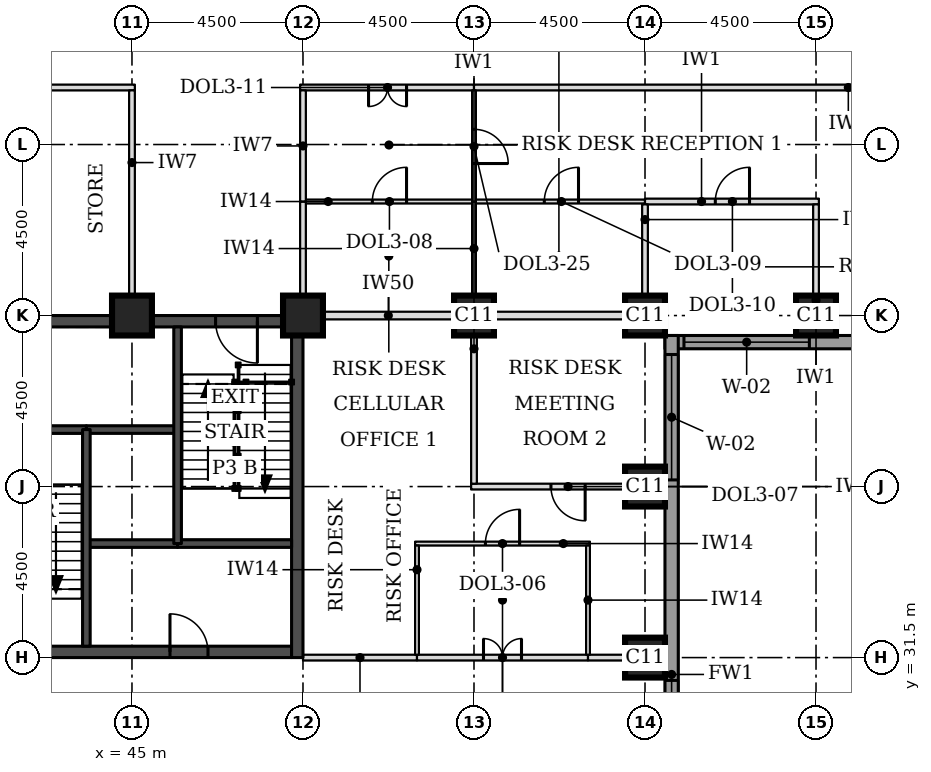
"""IFC4 building model, lengths in metres.
Left out: names, types, materials, properties, quantities, classifications, styles, units other than length and angle.
Written with IfcOpenShell. Run it as: python <this file> out.ifc"""

import sys

from ifc_helpers import new_model, si_unit, direction, frame, frame_2d, origin, origin_2d, place, context, subcontext, project, spatial, rectangle, extrude, element, fill, save


model = new_model("IFC4")
c1 = context("Model", 3, precision=1e-05, world=origin(), true_north=direction((0.0, 1.0)))
c2 = subcontext(c1, "Body", "Model", "MODEL_VIEW")
j1 = project(units=[si_unit("LENGTHUNIT", "METRE"), si_unit("PLANEANGLEUNIT", "RADIAN")], contexts=[c1])
p1 = place(None, origin())
s1 = spatial("IfcSite", under=j1, at=p1, CompositionType="ELEMENT")
p2 = place(p1, origin())
s2 = spatial("IfcBuilding", under=s1, at=p2, CompositionType="ELEMENT")
p3 = place(p2, frame((0.0, 0.0, 97.4)))
s3 = spatial("IfcBuildingStorey", under=s2, at=p3, CompositionType="ELEMENT", Elevation=97.4)
for number, where, z_axis, x_axis in (
    (1, (58.5, 31.5, 0.0), (0.0, 0.0, 1.0), (1.0, 0.0, 0.0)),
    (2, (58.5, 36.0, 0.0), (0.0, 0.0, 1.0), (1.0, 0.0, 0.0)),
    (3, (45.0, 40.5, 0.0), (0.0, 0.0, 1.0), (1.0, 0.0, 0.0)),
    (4, (49.5, 40.5, 0.0), (0.0, 0.0, 1.0), (1.0, 0.0, 0.0)),
    (5, (54.0, 40.5, 0.0), (0.0, 0.0, 1.0), (1.0, 0.0, 0.0)),
    (6, (58.5, 40.5, 0.0), (0.0, 0.0, 1.0), (1.0, 0.0, 0.0)),
    (7, (63.0, 40.5, 0.0), (0.0, 0.0, 1.0), (1.0, 0.0, 0.0)),
):
    element("IfcColumn", number, at=place(p3, frame(where, z_axis=z_axis, x_axis=x_axis)), inside=s3, PredefinedType="COLUMN", context=c2, shape_type="SweptSolid", body=[
        extrude(rectangle(XDim=1.05, YDim=1.05, at=origin_2d()), origin(), (0.0, 0.0, 1.0), 3.7),
    ])
p4 = place(p3, frame((40.8, 31.65, 0.0), z_axis=(0.0, 0.0, 1.0), x_axis=(1.0, 0.0, 0.0)))
e8 = element("IfcWall", 8, at=p4, inside=s3, PredefinedType="SHEAR", context=c2, shape_type="SweptSolid", body=[
    extrude(rectangle(XDim=8.4, YDim=0.3, at=frame_2d((4.2, 0.0))), origin(), (0.0, 0.0, 1.0), 3.7),
])
p5 = place(p4, frame((5.2, 0.0, 0.0)))
e9 = element("IfcOpeningElement", 9, at=p5, cuts=e8, PredefinedType="OPENING", context=c2, shape_type="SweptSolid", body=[
    extrude(rectangle(XDim=1.0, YDim=2.1, at=frame_2d((0.5, 1.05))), frame((0.0, 0.16, 0.0), z_axis=(0.0, -1.0, 0.0), x_axis=(1.0, 0.0, 0.0)), (0.0, 0.0, 1.0), 0.32),
])
p6 = place(p3, frame((40.8, 40.35, 0.0), z_axis=(0.0, 0.0, 1.0), x_axis=(1.0, 0.0, 0.0)))
e10 = element("IfcWall", 10, at=p6, inside=s3, PredefinedType="SHEAR", context=c2, shape_type="SweptSolid", body=[
    extrude(rectangle(XDim=8.4, YDim=0.3, at=frame_2d((4.2, 0.0))), origin(), (0.0, 0.0, 1.0), 3.7),
])
p7 = place(p6, frame((6.4, 0.0, 0.0)))
e11 = element("IfcOpeningElement", 11, at=p7, cuts=e10, PredefinedType="OPENING", context=c2, shape_type="SweptSolid", body=[
    extrude(rectangle(XDim=1.1, YDim=2.1, at=frame_2d((0.55, 1.05))), frame((0.0, 0.16, 0.0), z_axis=(0.0, -1.0, 0.0), x_axis=(1.0, 0.0, 0.0)), (0.0, 0.0, 1.0), 0.32),
])
p8 = place(p3, frame((49.35, 31.5, 0.0), z_axis=(0.0, 0.0, 1.0), x_axis=(0.0, 1.0, 0.0)))
e12 = element("IfcWall", 12, at=p8, inside=s3, PredefinedType="SHEAR", context=c2, shape_type="SweptSolid", body=[
    extrude(rectangle(XDim=9.0, YDim=0.3, at=frame_2d((4.5, 0.0))), origin(), (0.0, 0.0, 1.0), 3.7),
])
p9 = place(p3, frame((59.025, 39.8, 0.0), z_axis=(0.0, 0.0, 1.0), x_axis=(1.0, 0.0, 0.0)))
e13 = element("IfcWall", 13, at=p9, inside=s3, PredefinedType="STANDARD", context=c2, shape_type="SweptSolid", body=[
    extrude(rectangle(XDim=13.337, YDim=0.35, at=frame_2d((6.669, 0.0))), origin(), (0.0, 0.0, 1.0), 3.525),
])
p10 = place(p9, frame((0.5, 0.0, 0.9)))
e14 = element("IfcOpeningElement", 14, at=p10, cuts=e13, PredefinedType="OPENING", context=c2, shape_type="SweptSolid", body=[
    extrude(rectangle(XDim=3.3, YDim=1.9, at=frame_2d((1.65, 0.95))), frame((0.0, 0.185, 0.0), z_axis=(0.0, -1.0, 0.0), x_axis=(1.0, 0.0, 0.0)), (0.0, 0.0, 1.0), 0.37),
])
p11 = place(p3, frame((59.2, 22.138, 0.0), z_axis=(0.0, 0.0, 1.0), x_axis=(0.0, 1.0, 0.0)))
e15 = element("IfcWall", 15, at=p11, inside=s3, PredefinedType="STANDARD", context=c2, shape_type="SweptSolid", body=[
    extrude(rectangle(XDim=17.837, YDim=0.35, at=frame_2d((8.919, 0.0))), origin(), (0.0, 0.0, 1.0), 3.525),
])
p12 = place(p11, frame((5.462, 0.0, 0.9)))
e16 = element("IfcOpeningElement", 16, at=p12, cuts=e15, PredefinedType="OPENING", context=c2, shape_type="SweptSolid", body=[
    extrude(rectangle(XDim=3.3, YDim=1.9, at=frame_2d((1.65, 0.95))), frame((0.0, 0.185, 0.0), z_axis=(0.0, -1.0, 0.0), x_axis=(1.0, 0.0, 0.0)), (0.0, 0.0, 1.0), 0.37),
])
p13 = place(p11, frame((14.037, 0.0, 0.9)))
e17 = element("IfcOpeningElement", 17, at=p13, cuts=e15, PredefinedType="OPENING", context=c2, shape_type="SweptSolid", body=[
    extrude(rectangle(XDim=3.3, YDim=1.9, at=frame_2d((1.65, 0.95))), frame((0.0, 0.185, 0.0), z_axis=(0.0, -1.0, 0.0), x_axis=(1.0, 0.0, 0.0)), (0.0, 0.0, 1.0), 0.37),
])
p14 = place(p3, frame((49.5, 31.5, 0.0), z_axis=(0.0, 0.0, 1.0), x_axis=(1.0, 0.0, 0.0)))
e18 = element("IfcWall", 18, at=p14, inside=s3, PredefinedType="PARTITIONING", context=c2, shape_type="SweptSolid", body=[
    extrude(rectangle(XDim=3.0, YDim=0.15, at=frame_2d((1.5, 0.0))), origin(), (0.0, 0.0, 1.0), 2.55),
])
p15 = place(p3, frame((52.5, 31.5, 0.0), z_axis=(0.0, 0.0, 1.0), x_axis=(1.0, 0.0, 0.0)))
e19 = element("IfcWall", 19, at=p15, inside=s3, PredefinedType="PARTITIONING", context=c2, shape_type="SweptSolid", body=[
    extrude(rectangle(XDim=4.5, YDim=0.15, at=frame_2d((2.25, 0.0))), origin(), (0.0, 0.0, 1.0), 2.55),
])
p16 = place(p15, frame((1.75, 0.0, 0.0)))
e20 = element("IfcOpeningElement", 20, at=p16, cuts=e19, PredefinedType="OPENING", context=c2, shape_type="SweptSolid", body=[
    extrude(rectangle(XDim=1.0, YDim=2.1, at=frame_2d((0.5, 1.05))), frame((0.0, 0.085, 0.0), z_axis=(0.0, -1.0, 0.0), x_axis=(1.0, 0.0, 0.0)), (0.0, 0.0, 1.0), 0.17),
])
p17 = place(p3, frame((57.0, 31.5, 0.0), z_axis=(0.0, 0.0, 1.0), x_axis=(1.0, 0.0, 0.0)))
e21 = element("IfcWall", 21, at=p17, inside=s3, PredefinedType="PARTITIONING", context=c2, shape_type="SweptSolid", body=[
    extrude(rectangle(XDim=2.025, YDim=0.15, at=frame_2d((1.012, 0.0))), origin(), (0.0, 0.0, 1.0), 2.55),
])
p18 = place(p3, frame((52.45, 34.5, 0.0), z_axis=(0.0, 0.0, 1.0), x_axis=(1.0, 0.0, 0.0)))
e22 = element("IfcWall", 22, at=p18, inside=s3, PredefinedType="PARTITIONING", context=c2, shape_type="SweptSolid", body=[
    extrude(rectangle(XDim=4.6, YDim=0.1, at=frame_2d((2.3, 0.0))), origin(), (0.0, 0.0, 1.0), 3.55),
])
p19 = place(p18, frame((1.85, 0.0, 0.0)))
e23 = element("IfcOpeningElement", 23, at=p19, cuts=e22, PredefinedType="OPENING", context=c2, shape_type="SweptSolid", body=[
    extrude(rectangle(XDim=0.9, YDim=2.1, at=frame_2d((0.45, 1.05))), frame((0.0, 0.06, 0.0), z_axis=(0.0, -1.0, 0.0), x_axis=(1.0, 0.0, 0.0)), (0.0, 0.0, 1.0), 0.12),
])
p20 = place(p3, frame((53.925, 36.0, 0.0), z_axis=(0.0, 0.0, 1.0), x_axis=(1.0, 0.0, 0.0)))
e24 = element("IfcWall", 24, at=p20, inside=s3, PredefinedType="PARTITIONING", context=c2, shape_type="SweptSolid", body=[
    extrude(rectangle(XDim=5.1, YDim=0.15, at=frame_2d((2.55, 0.0))), origin(), (0.0, 0.0, 1.0), 3.096),
])
p21 = place(p20, frame((2.1, 0.0, 0.0)))
e25 = element("IfcOpeningElement", 25, at=p21, cuts=e24, PredefinedType="OPENING", context=c2, shape_type="SweptSolid", body=[
    extrude(rectangle(XDim=0.9, YDim=2.1, at=frame_2d((0.45, 1.05))), frame((0.0, 0.085, 0.0), z_axis=(0.0, -1.0, 0.0), x_axis=(1.0, 0.0, 0.0)), (0.0, 0.0, 1.0), 0.17),
])
p22 = place(p3, frame((50.015, 40.5, 0.0), z_axis=(0.0, 0.0, 1.0), x_axis=(1.0, 0.0, 0.0)))
e26 = element("IfcWall", 26, at=p22, inside=s3, PredefinedType="PARTITIONING", context=c2, shape_type="SweptSolid", body=[
    extrude(rectangle(XDim=3.46, YDim=0.2, at=frame_2d((1.73, 0.0))), origin(), (0.0, 0.0, 1.0), 2.8),
])
p23 = place(p3, frame((54.495, 40.5, 0.0), z_axis=(0.0, 0.0, 1.0), x_axis=(1.0, 0.0, 0.0)))
e27 = element("IfcWall", 27, at=p23, inside=s3, PredefinedType="PARTITIONING", context=c2, shape_type="SweptSolid", body=[
    extrude(rectangle(XDim=3.48, YDim=0.2, at=frame_2d((1.74, 0.0))), origin(), (0.0, 0.0, 1.0), 2.8),
])
p24 = place(p3, frame((49.575, 43.5, 0.0), z_axis=(0.0, 0.0, 1.0), x_axis=(1.0, 0.0, 0.0)))
e28 = element("IfcWall", 28, at=p24, inside=s3, PredefinedType="PARTITIONING", context=c2, shape_type="SweptSolid", body=[
    extrude(rectangle(XDim=4.375, YDim=0.1, at=frame_2d((2.188, 0.0))), origin(), (0.0, 0.0, 1.0), 3.55),
])
p25 = place(p24, frame((1.75, 0.0, 0.0)))
e29 = element("IfcOpeningElement", 29, at=p25, cuts=e28, PredefinedType="OPENING", context=c2, shape_type="SweptSolid", body=[
    extrude(rectangle(XDim=0.9, YDim=2.1, at=frame_2d((0.45, 1.05))), frame((0.0, 0.06, 0.0), z_axis=(0.0, -1.0, 0.0), x_axis=(1.0, 0.0, 0.0)), (0.0, 0.0, 1.0), 0.12),
])
p26 = place(p3, frame((54.05, 43.5, 0.0), z_axis=(0.0, 0.0, 1.0), x_axis=(1.0, 0.0, 0.0)))
e30 = element("IfcWall", 30, at=p26, inside=s3, PredefinedType="PARTITIONING", context=c2, shape_type="SweptSolid", body=[
    extrude(rectangle(XDim=4.45, YDim=0.1, at=frame_2d((2.225, 0.0))), origin(), (0.0, 0.0, 1.0), 3.55),
])
p27 = place(p26, frame((1.8, 0.0, 0.0)))
e31 = element("IfcOpeningElement", 31, at=p27, cuts=e30, PredefinedType="OPENING", context=c2, shape_type="SweptSolid", body=[
    extrude(rectangle(XDim=0.9, YDim=2.1, at=frame_2d((0.45, 1.05))), frame((0.0, 0.06, 0.0), z_axis=(0.0, -1.0, 0.0), x_axis=(1.0, 0.0, 0.0)), (0.0, 0.0, 1.0), 0.12),
])
p28 = place(p3, frame((58.5, 43.5, 0.0), z_axis=(0.0, 0.0, 1.0), x_axis=(1.0, 0.0, 0.0)))
e32 = element("IfcWall", 32, at=p28, inside=s3, PredefinedType="PARTITIONING", context=c2, shape_type="SweptSolid", body=[
    extrude(rectangle(XDim=4.575, YDim=0.15, at=frame_2d((2.288, 0.0))), origin(), (0.0, 0.0, 1.0), 3.55),
])
p29 = place(p28, frame((1.85, 0.0, 0.0)))
e33 = element("IfcOpeningElement", 33, at=p29, cuts=e32, PredefinedType="OPENING", context=c2, shape_type="SweptSolid", body=[
    extrude(rectangle(XDim=0.9, YDim=2.1, at=frame_2d((0.45, 1.05))), frame((0.0, 0.085, 0.0), z_axis=(0.0, -1.0, 0.0), x_axis=(1.0, 0.0, 0.0)), (0.0, 0.0, 1.0), 0.17),
])
p30 = place(p3, frame((40.425, 46.5, 0.0), z_axis=(0.0, 0.0, 1.0), x_axis=(1.0, 0.0, 0.0)))
e34 = element("IfcWall", 34, at=p30, inside=s3, PredefinedType="PARTITIONING", context=c2, shape_type="SweptSolid", body=[
    extrude(rectangle(XDim=4.65, YDim=0.15, at=frame_2d((2.325, 0.0))), origin(), (0.0, 0.0, 1.0), 3.55),
])
p31 = place(p3, frame((49.425, 46.5, 0.0), z_axis=(0.0, 0.0, 1.0), x_axis=(1.0, 0.0, 0.0)))
e35 = element("IfcWall", 35, at=p31, inside=s3, PredefinedType="PARTITIONING", context=c2, shape_type="SweptSolid", body=[
    extrude(rectangle(XDim=4.575, YDim=0.15, at=frame_2d((2.288, 0.0))), origin(), (0.0, 0.0, 1.0), 3.55),
])
p32 = place(p31, frame((1.8, 0.0, 0.0)))
e36 = element("IfcOpeningElement", 36, at=p32, cuts=e35, PredefinedType="OPENING", context=c2, shape_type="SweptSolid", body=[
    extrude(rectangle(XDim=1.0, YDim=2.1, at=frame_2d((0.5, 1.05))), frame((0.0, 0.085, 0.0), z_axis=(0.0, -1.0, 0.0), x_axis=(1.0, 0.0, 0.0)), (0.0, 0.0, 1.0), 0.17),
])
p33 = place(p3, frame((54.0, 46.5, 0.0), z_axis=(0.0, 0.0, 1.0), x_axis=(1.0, 0.0, 0.0)))
e37 = element("IfcWall", 37, at=p33, inside=s3, PredefinedType="PARTITIONING", context=c2, shape_type="SweptSolid", body=[
    extrude(rectangle(XDim=16.5, YDim=0.15, at=frame_2d((8.25, 0.0))), origin(), (0.0, 0.0, 1.0), 3.55),
])
for number, where, z_axis, x_axis in (
    (38, (52.5, 31.575, 0.0), (0.0, 0.0, 1.0), (0.0, 1.0, 0.0)),
    (39, (57.0, 31.575, 0.0), (0.0, 0.0, 1.0), (0.0, 1.0, 0.0)),
):
    element("IfcWall", number, at=place(p3, frame(where, z_axis=z_axis, x_axis=x_axis)), inside=s3, PredefinedType="PARTITIONING", context=c2, shape_type="SweptSolid", body=[
        extrude(rectangle(XDim=2.875, YDim=0.1, at=frame_2d((1.438, 0.0))), origin(), (0.0, 0.0, 1.0), 3.55),
    ])
p34 = place(p3, frame((54.0, 36.075, 0.0), z_axis=(0.0, 0.0, 1.0), x_axis=(0.0, 1.0, 0.0)))
e40 = element("IfcWall", 40, at=p34, inside=s3, PredefinedType="PARTITIONING", context=c2, shape_type="SweptSolid", body=[
    extrude(rectangle(XDim=3.9, YDim=0.15, at=frame_2d((1.95, 0.0))), origin(), (0.0, 0.0, 1.0), 3.55),
])
p35 = place(p3, frame((63.0, 39.975, 0.0), z_axis=(0.0, 0.0, 1.0), x_axis=(0.0, 1.0, 0.0)))
e41 = element("IfcWall", 41, at=p35, inside=s3, PredefinedType="PARTITIONING", context=c2, shape_type="SweptSolid", body=[
    extrude(rectangle(XDim=3.45, YDim=0.15, at=frame_2d((1.725, 0.0))), origin(), (0.0, 0.0, 1.0), 3.55),
])
p36 = place(p3, frame((45.0, 41.025, 0.0), z_axis=(0.0, 0.0, 1.0), x_axis=(0.0, 1.0, 0.0)))
e42 = element("IfcWall", 42, at=p36, inside=s3, PredefinedType="PARTITIONING", context=c2, shape_type="SweptSolid", body=[
    extrude(rectangle(XDim=5.4, YDim=0.15, at=frame_2d((2.7, 0.0))), origin(), (0.0, 0.0, 1.0), 3.55),
])
p37 = place(p3, frame((49.5, 41.025, 0.0), z_axis=(0.0, 0.0, 1.0), x_axis=(0.0, 1.0, 0.0)))
e43 = element("IfcWall", 43, at=p37, inside=s3, PredefinedType="PARTITIONING", context=c2, shape_type="SweptSolid", body=[
    extrude(rectangle(XDim=2.475, YDim=0.15, at=frame_2d((1.238, 0.0))), origin(), (0.0, 0.0, 1.0), 3.55),
])
p38 = place(p3, frame((54.0, 41.025, 0.0), z_axis=(0.0, 0.0, 1.0), x_axis=(0.0, 1.0, 0.0)))
e44 = element("IfcWall", 44, at=p38, inside=s3, PredefinedType="PARTITIONING", context=c2, shape_type="SweptSolid", body=[
    extrude(rectangle(XDim=2.475, YDim=0.1, at=frame_2d((1.238, 0.0))), origin(), (0.0, 0.0, 1.0), 3.55),
])
p39 = place(p3, frame((58.5, 41.025, 0.0), z_axis=(0.0, 0.0, 1.0), x_axis=(0.0, 1.0, 0.0)))
e45 = element("IfcWall", 45, at=p39, inside=s3, PredefinedType="PARTITIONING", context=c2, shape_type="SweptSolid", body=[
    extrude(rectangle(XDim=2.4, YDim=0.15, at=frame_2d((1.2, 0.0))), origin(), (0.0, 0.0, 1.0), 3.55),
])
p40 = place(p3, frame((49.5, 43.5, 0.0), z_axis=(0.0, 0.0, 1.0), x_axis=(0.0, 1.0, 0.0)))
e46 = element("IfcWall", 46, at=p40, inside=s3, PredefinedType="PARTITIONING", context=c2, shape_type="SweptSolid", body=[
    extrude(rectangle(XDim=2.925, YDim=0.15, at=frame_2d((1.462, 0.0))), origin(), (0.0, 0.0, 1.0), 3.55),
])
p41 = place(p3, frame((54.0, 43.5, 0.0), z_axis=(0.0, 0.0, 1.0), x_axis=(0.0, 1.0, 0.0)))
e47 = element("IfcWall", 47, at=p41, inside=s3, PredefinedType="PARTITIONING", context=c2, shape_type="SweptSolid", body=[
    extrude(rectangle(XDim=2.925, YDim=0.1, at=frame_2d((1.462, 0.0))), origin(), (0.0, 0.0, 1.0), 3.55),
])
p42 = place(p41, frame((1.0, 0.0, 0.0)))
e48 = element("IfcOpeningElement", 48, at=p42, cuts=e47, PredefinedType="OPENING", context=c2, shape_type="SweptSolid", body=[
    extrude(rectangle(XDim=0.9, YDim=2.1, at=frame_2d((0.45, 1.05))), frame((0.0, 0.06, 0.0), z_axis=(0.0, -1.0, 0.0), x_axis=(1.0, 0.0, 0.0)), (0.0, 0.0, 1.0), 0.12),
])
p43 = place(p3, frame((43.8, 34.5, 0.0), z_axis=(0.0, 0.0, 1.0), x_axis=(1.0, 0.0, 0.0)))
e49 = element("IfcWall", 49, at=p43, inside=s3, PredefinedType="SOLIDWALL", context=c2, shape_type="SweptSolid", body=[
    extrude(rectangle(XDim=2.4, YDim=0.2, at=frame_2d((1.2, 0.0))), origin(), (0.0, 0.0, 1.0), 3.55),
])
p44 = place(p3, frame((46.2, 34.5, 0.0), z_axis=(0.0, 0.0, 1.0), x_axis=(1.0, 0.0, 0.0)))
e50 = element("IfcWall", 50, at=p44, inside=s3, PredefinedType="SOLIDWALL", context=c2, shape_type="SweptSolid", body=[
    extrude(rectangle(XDim=3.0, YDim=0.2, at=frame_2d((1.5, 0.0))), origin(), (0.0, 0.0, 1.0), 3.55),
])
p45 = place(p3, frame((43.8, 37.5, 0.0), z_axis=(0.0, 0.0, 1.0), x_axis=(1.0, 0.0, 0.0)))
e51 = element("IfcWall", 51, at=p45, inside=s3, PredefinedType="SOLIDWALL", context=c2, shape_type="SweptSolid", body=[
    extrude(rectangle(XDim=2.4, YDim=0.2, at=frame_2d((1.2, 0.0))), origin(), (0.0, 0.0, 1.0), 3.7),
])
p46 = place(p3, frame((40.8, 37.5, 0.0), z_axis=(0.0, 0.0, 1.0), x_axis=(1.0, 0.0, 0.0)))
e52 = element("IfcWall", 52, at=p46, inside=s3, PredefinedType="SOLIDWALL", context=c2, shape_type="SweptSolid", body=[
    extrude(rectangle(XDim=3.0, YDim=0.2, at=frame_2d((1.5, 0.0))), origin(), (0.0, 0.0, 1.0), 3.55),
])
for number, where, z_axis, x_axis in (
    (53, (43.8, 31.8, 0.0), (0.0, 0.0, 1.0), (0.0, 1.0, 0.0)),
    (54, (46.2, 34.5, 0.0), (0.0, 0.0, 1.0), (0.0, 1.0, 0.0)),
):
    element("IfcWall", number, at=place(p3, frame(where, z_axis=z_axis, x_axis=x_axis)), inside=s3, PredefinedType="SOLIDWALL", context=c2, shape_type="SweptSolid", body=[
        extrude(rectangle(XDim=5.7, YDim=0.2, at=frame_2d((2.85, 0.0))), origin(), (0.0, 0.0, 1.0), 3.55),
    ])
p47 = place(p10, origin())
e55 = element("IfcWindow", 55, at=p47, inside=s3, PartitioningType="SINGLE_PANEL", PredefinedType="WINDOW", context=c2, shape_type="SweptSolid", body=[
    extrude(rectangle(XDim=3.3, YDim=1.9, at=frame_2d((1.65, 0.95))), frame((0.0, 0.085, 0.0), z_axis=(0.0, -1.0, 0.0), x_axis=(1.0, 0.0, 0.0)), (0.0, 0.0, 1.0), 0.06),
])
fill(e14, e55)
p48 = place(p12, origin())
e56 = element("IfcWindow", 56, at=p48, inside=s3, PartitioningType="SINGLE_PANEL", PredefinedType="WINDOW", context=c2, shape_type="SweptSolid", body=[
    extrude(rectangle(XDim=3.3, YDim=1.9, at=frame_2d((1.65, 0.95))), frame((0.0, 0.085, 0.0), z_axis=(0.0, -1.0, 0.0), x_axis=(1.0, 0.0, 0.0)), (0.0, 0.0, 1.0), 0.06),
])
fill(e16, e56)
p49 = place(p13, origin())
e57 = element("IfcWindow", 57, at=p49, inside=s3, PartitioningType="SINGLE_PANEL", PredefinedType="WINDOW", context=c2, shape_type="SweptSolid", body=[
    extrude(rectangle(XDim=3.3, YDim=1.9, at=frame_2d((1.65, 0.95))), frame((0.0, 0.085, 0.0), z_axis=(0.0, -1.0, 0.0), x_axis=(1.0, 0.0, 0.0)), (0.0, 0.0, 1.0), 0.06),
])
fill(e17, e57)
p50 = place(p32, frame((1.0, 0.0, 0.0), z_axis=(0.0, 0.0, 1.0), x_axis=(-1.0, 0.0, 0.0)))
e58 = element("IfcDoor", 58, at=p50, inside=s3, OperationType="DOUBLE_DOOR_SINGLE_SWING", PredefinedType="DOOR", context=c2, shape_type="SweptSolid", body=[
    extrude(rectangle(XDim=1.0, YDim=2.1, at=frame_2d((0.5, 1.05))), frame((0.0, 0.025, 0.0), z_axis=(0.0, -1.0, 0.0), x_axis=(1.0, 0.0, 0.0)), (0.0, 0.0, 1.0), 0.05),
])
fill(e36, e58)
p51 = place(p42, frame((0.9, 0.0, 0.0), z_axis=(0.0, 0.0, 1.0), x_axis=(-1.0, 0.0, 0.0)))
e59 = element("IfcDoor", 59, at=p51, inside=s3, OperationType="SINGLE_SWING_RIGHT", PredefinedType="DOOR", context=c2, shape_type="SweptSolid", body=[
    extrude(rectangle(XDim=0.9, YDim=2.1, at=frame_2d((0.45, 1.05))), frame((0.0, 0.025, 0.0), z_axis=(0.0, -1.0, 0.0), x_axis=(1.0, 0.0, 0.0)), (0.0, 0.0, 1.0), 0.05),
])
fill(e48, e59)
p52 = place(p25, origin())
e60 = element("IfcDoor", 60, at=p52, inside=s3, OperationType="SINGLE_SWING_RIGHT", PredefinedType="DOOR", context=c2, shape_type="SweptSolid", body=[
    extrude(rectangle(XDim=0.9, YDim=2.1, at=frame_2d((0.45, 1.05))), frame((0.0, 0.025, 0.0), z_axis=(0.0, -1.0, 0.0), x_axis=(1.0, 0.0, 0.0)), (0.0, 0.0, 1.0), 0.05),
])
fill(e29, e60)
p53 = place(p27, origin())
e61 = element("IfcDoor", 61, at=p53, inside=s3, OperationType="SINGLE_SWING_RIGHT", PredefinedType="DOOR", context=c2, shape_type="SweptSolid", body=[
    extrude(rectangle(XDim=0.9, YDim=2.1, at=frame_2d((0.45, 1.05))), frame((0.0, 0.025, 0.0), z_axis=(0.0, -1.0, 0.0), x_axis=(1.0, 0.0, 0.0)), (0.0, 0.0, 1.0), 0.05),
])
fill(e31, e61)
p54 = place(p29, origin())
e62 = element("IfcDoor", 62, at=p54, inside=s3, OperationType="SINGLE_SWING_RIGHT", PredefinedType="DOOR", context=c2, shape_type="SweptSolid", body=[
    extrude(rectangle(XDim=0.9, YDim=2.1, at=frame_2d((0.45, 1.05))), frame((0.0, 0.025, 0.0), z_axis=(0.0, -1.0, 0.0), x_axis=(1.0, 0.0, 0.0)), (0.0, 0.0, 1.0), 0.05),
])
fill(e33, e62)
p55 = place(p16, origin())
e63 = element("IfcDoor", 63, at=p55, inside=s3, OperationType="DOUBLE_DOOR_SINGLE_SWING", PredefinedType="DOOR", context=c2, shape_type="SweptSolid", body=[
    extrude(rectangle(XDim=1.0, YDim=2.1, at=frame_2d((0.5, 1.05))), frame((0.0, 0.025, 0.0), z_axis=(0.0, -1.0, 0.0), x_axis=(1.0, 0.0, 0.0)), (0.0, 0.0, 1.0), 0.05),
])
fill(e20, e63)
p56 = place(p19, origin())
e64 = element("IfcDoor", 64, at=p56, inside=s3, OperationType="SINGLE_SWING_RIGHT", PredefinedType="DOOR", context=c2, shape_type="SweptSolid", body=[
    extrude(rectangle(XDim=0.9, YDim=2.1, at=frame_2d((0.45, 1.05))), frame((0.0, 0.025, 0.0), z_axis=(0.0, -1.0, 0.0), x_axis=(1.0, 0.0, 0.0)), (0.0, 0.0, 1.0), 0.05),
])
fill(e23, e64)
p57 = place(p21, frame((0.9, 0.0, 0.0), z_axis=(0.0, 0.0, 1.0), x_axis=(-1.0, 0.0, 0.0)))
e65 = element("IfcDoor", 65, at=p57, inside=s3, OperationType="SINGLE_SWING_LEFT", PredefinedType="DOOR", context=c2, shape_type="SweptSolid", body=[
    extrude(rectangle(XDim=0.9, YDim=2.1, at=frame_2d((0.45, 1.05))), frame((0.0, 0.025, 0.0), z_axis=(0.0, -1.0, 0.0), x_axis=(1.0, 0.0, 0.0)), (0.0, 0.0, 1.0), 0.05),
])
fill(e25, e65)
p58 = place(p7, frame((1.1, 0.0, 0.0), z_axis=(0.0, 0.0, 1.0), x_axis=(-1.0, 0.0, 0.0)))
e66 = element("IfcDoor", 66, at=p58, inside=s3, OperationType="SINGLE_SWING_LEFT", PredefinedType="DOOR", context=c2, shape_type="SweptSolid", body=[
    extrude(rectangle(XDim=1.1, YDim=2.1, at=frame_2d((0.55, 1.05))), frame((0.0, 0.025, 0.0), z_axis=(0.0, -1.0, 0.0), x_axis=(1.0, 0.0, 0.0)), (0.0, 0.0, 1.0), 0.05),
])
fill(e11, e66)
p59 = place(p5, origin())
e67 = element("IfcDoor", 67, at=p59, inside=s3, OperationType="SINGLE_SWING_LEFT", PredefinedType="DOOR", context=c2, shape_type="SweptSolid", body=[
    extrude(rectangle(XDim=1.0, YDim=2.1, at=frame_2d((0.5, 1.05))), frame((0.0, 0.025, 0.0), z_axis=(0.0, -1.0, 0.0), x_axis=(1.0, 0.0, 0.0)), (0.0, 0.0, 1.0), 0.05),
])
fill(e9, e67)
save(model, sys.argv[1])
